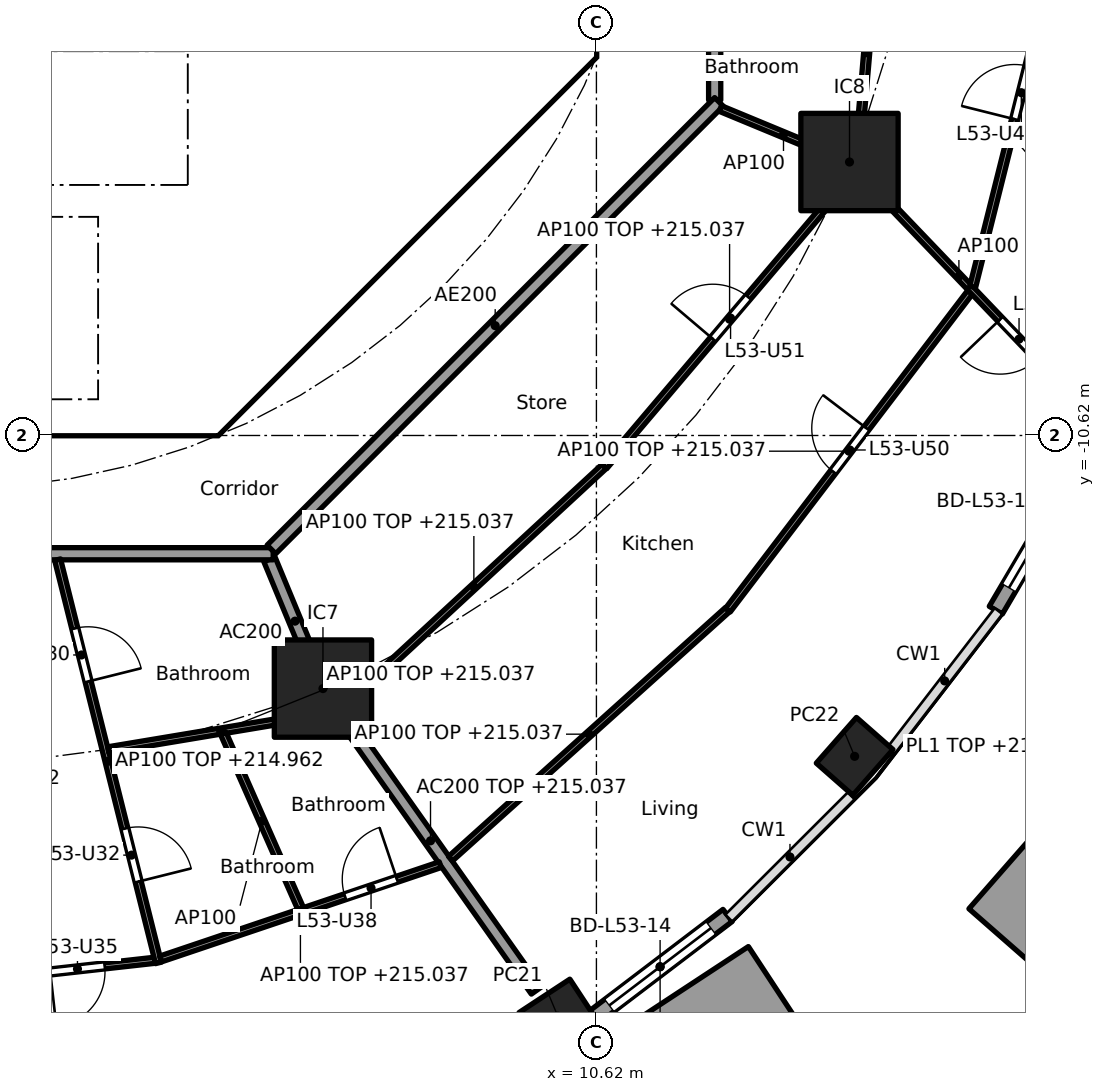
"""IFC4 building model, lengths in metres.
Left out: names, types, materials, properties, quantities, classifications, styles, units other than length and angle.
Written with IfcOpenShell. Run it as: python <this file> out.ifc"""

import sys

from ifc_helpers import new_model, si_unit, direction, frame, frame_2d, origin, origin_2d, place, context, subcontext, project, spatial, polyline, rectangle, hollow_rectangle, outline, extrude, element, fill, save


model = new_model("IFC4")
c1 = context("Model", 3, precision=1e-05, world=origin(), true_north=direction((0.0, 1.0)))
c2 = subcontext(c1, "Body", "Model", "MODEL_VIEW")
j1 = project(units=[si_unit("LENGTHUNIT", "METRE"), si_unit("PLANEANGLEUNIT", "RADIAN")], contexts=[c1])
p1 = place(None, origin())
s1 = spatial("IfcSite", under=j1, at=p1, CompositionType="ELEMENT")
p2 = place(p1, origin())
s2 = spatial("IfcBuilding", under=s1, at=p2, CompositionType="ELEMENT")
p3 = place(p2, frame((0.0, 0.0, 212.2)))
s3 = spatial("IfcBuildingStorey", under=s2, at=p3, CompositionType="ELEMENT", Elevation=212.2)
for number, where, z_axis, x_axis in (
    (1, (9.985, -20.17, -0.26), (0.0, 0.0, 1.0), (0.836, 0.549, 0.0)),
    (2, (14.866, -15.896, -0.26), (0.0, 0.0, 1.0), (0.66, 0.751, 0.0)),
):
    element("IfcColumn", number, at=place(p3, frame(where, z_axis=z_axis, x_axis=x_axis)), inside=s3, PredefinedType="COLUMN", context=c2, shape_type="SweptSolid", body=[
        extrude(hollow_rectangle(XDim=1.0, YDim=0.8, WallThickness=0.032, at=origin_2d()), origin(), (0.0, 0.0, 1.0), 3.96),
    ])
for number, where, z_axis, x_axis in (
    (3, (6.123, -14.782, 0.0), (0.0, 0.0, 1.0), (1.0, 0.0, 0.0)),
    (4, (14.782, -6.123, 0.0), (0.0, 0.0, 1.0), (1.0, 0.0, 0.0)),
):
    element("IfcColumn", number, at=place(p3, frame(where, z_axis=z_axis, x_axis=x_axis)), inside=s3, PredefinedType="COLUMN", context=c2, shape_type="SweptSolid", body=[
        extrude(rectangle(XDim=1.6, YDim=1.6, at=origin_2d()), origin(), (0.0, 0.0, 1.0), 3.7),
    ])
p4 = place(p3, frame((12.777, -18.513, 0.0), z_axis=(0.0, 0.0, 1.0), x_axis=(-0.796022158395, -0.605267480825, 0.0)))
e5 = element("IfcWall", 5, at=p4, inside=s3, PredefinedType="SOLIDWALL", context=c2, shape_type="SweptSolid", body=[
    extrude(rectangle(XDim=2.789, YDim=0.25, at=frame_2d((1.395, 0.0))), origin(), (0.0, 0.0, 1.0), 3.44),
])
p5 = place(p4, frame((0.344, 0.0, 0.0)))
e6 = element("IfcOpeningElement", 6, at=p5, cuts=e5, PredefinedType="OPENING", context=c2, shape_type="SweptSolid", body=[
    extrude(rectangle(XDim=2.1, YDim=2.4, at=frame_2d((1.05, 1.2))), frame((0.0, 0.135, 0.0), z_axis=(0.0, -1.0, 0.0), x_axis=(1.0, 0.0, 0.0)), (0.0, 0.0, 1.0), 0.27),
])
p6 = place(p3, frame((18.684, -10.945, 0.0), z_axis=(0.0, 0.0, 1.0), x_axis=(-0.5063555387, -0.862324804484, 0.0)))
e7 = element("IfcWall", 7, at=p6, inside=s3, PredefinedType="SOLIDWALL", context=c2, shape_type="SweptSolid", body=[
    extrude(rectangle(XDim=2.955, YDim=0.25, at=frame_2d((1.477, 0.0))), origin(), (0.0, 0.0, 1.0), 3.44),
])
p7 = place(p6, frame((0.427, 0.0, 0.0)))
e8 = element("IfcOpeningElement", 8, at=p7, cuts=e7, PredefinedType="OPENING", context=c2, shape_type="SweptSolid", body=[
    extrude(rectangle(XDim=2.1, YDim=2.4, at=frame_2d((1.05, 1.2))), frame((0.0, 0.135, 0.0), z_axis=(0.0, -1.0, 0.0), x_axis=(1.0, 0.0, 0.0)), (0.0, 0.0, 1.0), 0.27),
])
p8 = place(p3, frame((8.084, -23.289, 0.0), z_axis=(0.0, 0.0, 1.0), x_axis=(0.83581006315, 0.549018704907, 0.0)))
e9 = element("IfcWall", 9, at=p8, inside=s3, PredefinedType="SOLIDWALL", context=c2, shape_type="SweptSolid", body=[
    extrude(rectangle(XDim=6.55, YDim=1.6, at=frame_2d((3.275, 0.0))), origin(), (0.0, 0.0, 1.0), 1.1),
])
p9 = place(p3, frame((20.423, -19.665, 0.0), z_axis=(0.0, 0.0, 1.0), x_axis=(-0.795875560639, -0.605460231541, 0.0)))
e10 = element("IfcWall", 10, at=p9, inside=s3, PredefinedType="SOLIDWALL", context=c2, shape_type="SweptSolid", body=[
    extrude(rectangle(XDim=9.44, YDim=1.6, at=frame_2d((4.72, 0.0))), origin(), (0.0, 0.0, 1.0), 1.1),
])
p10 = place(p3, frame((17.348, -18.93, 0.0), z_axis=(0.0, 0.0, 1.0), x_axis=(0.65874885124, 0.752362911759, 0.0)))
e11 = element("IfcWall", 11, at=p10, inside=s3, PredefinedType="SOLIDWALL", context=c2, shape_type="SweptSolid", body=[
    extrude(rectangle(XDim=4.316, YDim=1.6, at=frame_2d((2.158, 0.0))), origin(), (0.0, 0.0, 1.0), 1.1),
])
p11 = place(p3, frame((4.613, -9.988, 0.0), z_axis=(0.0, 0.0, 1.0), x_axis=(0.707106781187, 0.707106781187, 0.0)))
e12 = element("IfcWall", 12, at=p11, inside=s3, PredefinedType="SHEAR", context=c2, shape_type="SweptSolid", body=[
    extrude(rectangle(XDim=7.602, YDim=0.6, at=frame_2d((3.801, 0.0))), origin(), (0.0, 0.0, 1.0), 3.44),
])
p12 = place(p11, frame((3.201, 0.0, 0.0)))
e13 = element("IfcOpeningElement", 13, at=p12, cuts=e12, PredefinedType="OPENING", context=c2, shape_type="SweptSolid", body=[
    extrude(rectangle(XDim=1.2, YDim=2.1, at=frame_2d((0.6, 1.05))), frame((0.0, 0.31, 0.0), z_axis=(0.0, -1.0, 0.0), x_axis=(1.0, 0.0, 0.0)), (0.0, 0.0, 1.0), 0.62),
])
p13 = place(p3, frame((4.0, -10.025, 0.0), z_axis=(0.0, 0.0, 1.0), x_axis=(0.0, 1.0, 0.0)))
e14 = element("IfcWall", 14, at=p13, inside=s3, PredefinedType="SOLIDWALL", context=c2, shape_type="SweptSolid", body=[
    extrude(rectangle(XDim=3.0, YDim=0.2, at=frame_2d((1.5, 0.0))), origin(), (0.0, 0.0, 1.0), 3.44),
])
p14 = place(p13, frame((0.975, 0.0, 0.0)))
e15 = element("IfcOpeningElement", 15, at=p14, cuts=e14, PredefinedType="OPENING", context=c2, shape_type="SweptSolid", body=[
    extrude(rectangle(XDim=1.1, YDim=2.1, at=frame_2d((0.55, 1.05))), frame((0.0, 0.11, 0.0), z_axis=(0.0, -1.0, 0.0), x_axis=(1.0, 0.0, 0.0)), (0.0, 0.0, 1.0), 0.22),
])
p15 = place(p3, frame((4.0, -6.5, 0.0), z_axis=(0.0, 0.0, 1.0), x_axis=(0.0, 1.0, 0.0)))
e16 = element("IfcWall", 16, at=p15, inside=s3, PredefinedType="SOLIDWALL", context=c2, shape_type="SweptSolid", body=[
    extrude(rectangle(XDim=2.2, YDim=0.2, at=frame_2d((1.1, 0.0))), origin(), (0.0, 0.0, 1.0), 3.44),
])
p16 = place(p15, frame((0.55, 0.0, 0.0)))
e17 = element("IfcOpeningElement", 17, at=p16, cuts=e16, PredefinedType="OPENING", context=c2, shape_type="SweptSolid", body=[
    extrude(rectangle(XDim=1.1, YDim=2.1, at=frame_2d((0.55, 1.05))), frame((0.0, 0.11, 0.0), z_axis=(0.0, -1.0, 0.0), x_axis=(1.0, 0.0, 0.0)), (0.0, 0.0, 1.0), 0.22),
])
p17 = place(p3, origin())
e18 = element("IfcWall", 18, at=p17, inside=s3, PredefinedType="SHEAR", context=c2, shape_type="SweptSolid", body=[
    extrude(outline(polyline([(-4.152, -10.025), (4.152, -10.025), (4.401, -9.776), (4.825, -10.2), (4.401, -10.625), (-4.401, -10.625), (-4.825, -10.2), (-4.401, -9.776), (-4.152, -10.025)])), origin(), (0.0, 0.0, 1.0), 3.44),
])
p18 = place(p3, origin())
e19 = element("IfcWall", 19, at=p18, inside=s3, PredefinedType="SHEAR", context=c2, shape_type="SweptSolid", body=[
    extrude(outline(polyline([(9.776, -4.401), (10.025, -4.152), (10.025, -3.801), (10.025, 4.152), (9.776, 4.401), (10.2, 4.825), (10.625, 4.401), (10.625, -4.401), (10.2, -4.825), (9.776, -4.401)])), origin(), (0.0, 0.0, 1.0), 3.44),
])
p19 = place(p3, origin())
e20 = element("IfcWall", 20, at=p19, inside=s3, PredefinedType="SOLIDWALL", context=c2, shape_type="SweptSolid", body=[
    extrude(outline(polyline([(4.1, -7.025), (-4.1, -7.025), (-4.1, -6.5), (4.1, -6.5), (4.1, -7.025)])), origin(), (0.0, 0.0, 1.0), 3.44),
])
p20 = place(p3, frame((5.243, -12.657, 0.0), z_axis=(0.0, 0.0, 1.0), x_axis=(0.382691608661, -0.923876145736, 0.0)))
e21 = element("IfcWall", 21, at=p20, inside=s3, PredefinedType="PARTITIONING", context=c2, shape_type="SweptSolid", body=[
    extrude(rectangle(XDim=2.2, YDim=0.2, at=frame_2d((1.1, 0.0))), origin(), (0.0, 0.0, 1.0), 3.44),
])
p21 = place(p3, frame((6.152, -14.823, 0.0), z_axis=(0.0, 0.0, 1.0), x_axis=(0.576994695158, -0.816747893637, 0.0)))
e22 = element("IfcWall", 22, at=p21, inside=s3, PredefinedType="PARTITIONING", context=c2, shape_type="SweptSolid", body=[
    extrude(rectangle(XDim=6.03, YDim=0.2, at=frame_2d((3.015, 0.0))), origin(), (0.0, 0.0, 1.0), 2.837),
])
p22 = place(p3, frame((12.565, -5.104, 0.0), z_axis=(0.0, 0.0, 1.0), x_axis=(0.0, 1.0, 0.0)))
e23 = element("IfcWall", 23, at=p22, inside=s3, PredefinedType="PARTITIONING", context=c2, shape_type="SweptSolid", body=[
    extrude(rectangle(XDim=10.209, YDim=0.2, at=frame_2d((5.104, 0.0))), origin(), (0.0, 0.0, 1.0), 3.44),
])
p23 = place(p22, frame((4.604, 0.0, 0.0)))
e24 = element("IfcOpeningElement", 24, at=p23, cuts=e23, PredefinedType="OPENING", context=c2, shape_type="SweptSolid", body=[
    extrude(rectangle(XDim=1.0, YDim=2.1, at=frame_2d((0.5, 1.05))), frame((0.0, 0.11, 0.0), z_axis=(0.0, -1.0, 0.0), x_axis=(1.0, 0.0, 0.0)), (0.0, 0.0, 1.0), 0.22),
])
p24 = place(p3, frame((-5.104, -12.565, 0.0), z_axis=(0.0, 0.0, 1.0), x_axis=(1.0, 0.0, 0.0)))
e25 = element("IfcWall", 25, at=p24, inside=s3, PredefinedType="PARTITIONING", context=c2, shape_type="SweptSolid", body=[
    extrude(rectangle(XDim=10.409, YDim=0.2, at=frame_2d((5.205, 0.0))), origin(), (0.0, 0.0, 1.0), 3.44),
])
p25 = place(p24, frame((4.604, 0.0, 0.0)))
e26 = element("IfcOpeningElement", 26, at=p25, cuts=e25, PredefinedType="OPENING", context=c2, shape_type="SweptSolid", body=[
    extrude(rectangle(XDim=1.0, YDim=2.1, at=frame_2d((0.5, 1.05))), frame((0.0, 0.11, 0.0), z_axis=(0.0, -1.0, 0.0), x_axis=(1.0, 0.0, 0.0)), (0.0, 0.0, 1.0), 0.22),
])
p26 = place(p3, frame((5.275, -12.494, 0.0), z_axis=(0.0, 0.0, 1.0), x_axis=(0.707106781187, 0.707106781187, 0.0)))
e27 = element("IfcWall", 27, at=p26, inside=s3, PredefinedType="PARTITIONING", context=c2, shape_type="SweptSolid", body=[
    extrude(rectangle(XDim=10.409, YDim=0.2, at=frame_2d((5.205, 0.0))), origin(), (0.0, 0.0, 1.0), 3.44),
])
p27 = place(p3, frame((-1.726, -19.818, 0.0), z_axis=(0.0, 0.0, 1.0), x_axis=(0.99381893047, 0.111013212902, 0.0)))
e28 = element("IfcWall", 28, at=p27, inside=s3, PredefinedType="PARTITIONING", context=c2, shape_type="SweptSolid", body=[
    extrude(rectangle(XDim=5.113, YDim=0.1, at=frame_2d((2.557, 0.0))), origin(), (0.0, 0.0, 1.0), 2.837),
])
p28 = place(p27, frame((3.385, 0.0, 0.0)))
e29 = element("IfcOpeningElement", 29, at=p28, cuts=e28, PredefinedType="OPENING", context=c2, shape_type="SweptSolid", body=[
    extrude(rectangle(XDim=0.9, YDim=2.1, at=frame_2d((0.45, 1.05))), frame((0.0, 0.06, 0.0), z_axis=(0.0, -1.0, 0.0), x_axis=(1.0, 0.0, 0.0)), (0.0, 0.0, 1.0), 0.12),
])
p29 = place(p3, frame((1.759, -12.662, 0.0), z_axis=(0.0, 0.0, 1.0), x_axis=(0.242653275363, -0.970113079984, 0.0)))
e30 = element("IfcWall", 30, at=p29, inside=s3, PredefinedType="PARTITIONING", context=c2, shape_type="SweptSolid", body=[
    extrude(rectangle(XDim=6.836, YDim=0.1, at=frame_2d((3.418, 0.0))), origin(), (0.0, 0.0, 1.0), 2.762),
])
p30 = place(p29, frame((1.166, 0.0, 0.0)))
e31 = element("IfcOpeningElement", 31, at=p30, cuts=e30, PredefinedType="OPENING", context=c2, shape_type="SweptSolid", body=[
    extrude(rectangle(XDim=0.9, YDim=2.1, at=frame_2d((0.45, 1.05))), frame((0.0, 0.06, 0.0), z_axis=(0.0, -1.0, 0.0), x_axis=(1.0, 0.0, 0.0)), (0.0, 0.0, 1.0), 0.12),
])
p31 = place(p29, frame((4.559, 0.0, 0.0)))
e32 = element("IfcOpeningElement", 32, at=p31, cuts=e30, PredefinedType="OPENING", context=c2, shape_type="SweptSolid", body=[
    extrude(rectangle(XDim=0.9, YDim=2.1, at=frame_2d((0.45, 1.05))), frame((0.0, 0.06, 0.0), z_axis=(0.0, -1.0, 0.0), x_axis=(1.0, 0.0, 0.0)), (0.0, 0.0, 1.0), 0.12),
])
p32 = place(p3, frame((2.593, -15.789, 0.0), z_axis=(0.0, 0.0, 1.0), x_axis=(0.986385117656, 0.164451815639, 0.0)))
e33 = element("IfcWall", 33, at=p32, inside=s3, PredefinedType="PARTITIONING", context=c2, shape_type="SweptSolid", body=[
    extrude(rectangle(XDim=3.747, YDim=0.1, at=frame_2d((1.874, 0.0))), origin(), (0.0, 0.0, 1.0), 2.837),
])
p33 = place(p3, frame((3.453, -19.229, 0.0), z_axis=(0.0, 0.0, 1.0), x_axis=(0.947565610716, 0.31956128268, 0.0)))
e34 = element("IfcWall", 34, at=p33, inside=s3, PredefinedType="PARTITIONING", context=c2, shape_type="SweptSolid", body=[
    extrude(rectangle(XDim=4.853, YDim=0.1, at=frame_2d((2.426, 0.0))), origin(), (0.0, 0.0, 1.0), 2.837),
])
p34 = place(p33, frame((3.202, 0.0, 0.0)))
e35 = element("IfcOpeningElement", 35, at=p34, cuts=e34, PredefinedType="OPENING", context=c2, shape_type="SweptSolid", body=[
    extrude(rectangle(XDim=0.9, YDim=2.1, at=frame_2d((0.45, 1.05))), frame((0.0, 0.06, 0.0), z_axis=(0.0, -1.0, 0.0), x_axis=(1.0, 0.0, 0.0)), (0.0, 0.0, 1.0), 0.12),
])
p35 = place(p3, frame((4.485, -15.522, 0.0), z_axis=(0.0, 0.0, 1.0), x_axis=(0.40391918208, -0.914794673327, 0.0)))
e36 = element("IfcWall", 36, at=p35, inside=s3, PredefinedType="PARTITIONING", context=c2, shape_type="SweptSolid", body=[
    extrude(rectangle(XDim=3.146, YDim=0.1, at=frame_2d((1.573, 0.0))), origin(), (0.0, 0.0, 1.0), 3.44),
])
p36 = place(p3, frame((6.461, -15.088, 0.0), z_axis=(0.0, 0.0, 1.0), x_axis=(0.73461579427, 0.678483334217, 0.0)))
e37 = element("IfcWall", 37, at=p36, inside=s3, PredefinedType="PARTITIONING", context=c2, shape_type="SweptSolid", body=[
    extrude(rectangle(XDim=5.837, YDim=0.1, at=frame_2d((2.918, 0.0))), origin(), (0.0, 0.0, 1.0), 2.837),
])
p37 = place(p3, frame((8.22, -17.579, 0.0), z_axis=(0.0, 0.0, 1.0), x_axis=(0.743696370895, 0.668517544958, 0.0)))
e38 = element("IfcWall", 38, at=p37, inside=s3, PredefinedType="PARTITIONING", context=c2, shape_type="SweptSolid", body=[
    extrude(rectangle(XDim=6.125, YDim=0.1, at=frame_2d((3.062, 0.0))), origin(), (0.0, 0.0, 1.0), 2.837),
])
p38 = place(p3, frame((10.753, -11.132, 0.0), z_axis=(0.0, 0.0, 1.0), x_axis=(0.647001799757, 0.762488472773, 0.0)))
e39 = element("IfcWall", 39, at=p38, inside=s3, PredefinedType="PARTITIONING", context=c2, shape_type="SweptSolid", body=[
    extrude(rectangle(XDim=6.359, YDim=0.1, at=frame_2d((3.179, 0.0))), origin(), (0.0, 0.0, 1.0), 2.837),
])
p39 = place(p38, frame((2.754, 0.0, 0.0)))
e40 = element("IfcOpeningElement", 40, at=p39, cuts=e39, PredefinedType="OPENING", context=c2, shape_type="SweptSolid", body=[
    extrude(rectangle(XDim=0.9, YDim=2.1, at=frame_2d((0.45, 1.05))), frame((0.0, 0.06, 0.0), z_axis=(0.0, -1.0, 0.0), x_axis=(1.0, 0.0, 0.0)), (0.0, 0.0, 1.0), 0.12),
])
p40 = place(p3, frame((12.782, -13.491, 0.0), z_axis=(0.0, 0.0, 1.0), x_axis=(0.606136140755, 0.795360911078, 0.0)))
e41 = element("IfcWall", 41, at=p40, inside=s3, PredefinedType="PARTITIONING", context=c2, shape_type="SweptSolid", body=[
    extrude(rectangle(XDim=6.57, YDim=0.1, at=frame_2d((3.285, 0.0))), origin(), (0.0, 0.0, 1.0), 2.837),
])
p41 = place(p40, frame((2.86, 0.0, 0.0)))
e42 = element("IfcOpeningElement", 42, at=p41, cuts=e41, PredefinedType="OPENING", context=c2, shape_type="SweptSolid", body=[
    extrude(rectangle(XDim=0.9, YDim=2.1, at=frame_2d((0.45, 1.05))), frame((0.0, 0.06, 0.0), z_axis=(0.0, -1.0, 0.0), x_axis=(1.0, 0.0, 0.0)), (0.0, 0.0, 1.0), 0.12),
])
p42 = place(p3, frame((12.657, -5.243, 0.0), z_axis=(0.0, 0.0, 1.0), x_axis=(0.923864733477, -0.382719158442, 0.0)))
e43 = element("IfcWall", 43, at=p42, inside=s3, PredefinedType="PARTITIONING", context=c2, shape_type="SweptSolid", body=[
    extrude(rectangle(XDim=2.25, YDim=0.1, at=frame_2d((1.125, 0.0))), origin(), (0.0, 0.0, 1.0), 3.44),
])
p43 = place(p3, frame((14.817, -6.159, 0.0), z_axis=(0.0, 0.0, 1.0), x_axis=(0.691437669875, -0.722436120828, 0.0)))
e44 = element("IfcWall", 44, at=p43, inside=s3, PredefinedType="PARTITIONING", context=c2, shape_type="SweptSolid", body=[
    extrude(rectangle(XDim=5.104, YDim=0.1, at=frame_2d((2.552, 0.0))), origin(), (0.0, 0.0, 1.0), 3.44),
])
p44 = place(p43, frame((3.532, 0.0, 0.0)))
e45 = element("IfcOpeningElement", 45, at=p44, cuts=e44, PredefinedType="OPENING", context=c2, shape_type="SweptSolid", body=[
    extrude(rectangle(XDim=0.9, YDim=2.1, at=frame_2d((0.45, 1.05))), frame((0.0, 0.06, 0.0), z_axis=(0.0, -1.0, 0.0), x_axis=(1.0, 0.0, 0.0)), (0.0, 0.0, 1.0), 0.12),
])
p45 = place(p3, frame((14.904, -6.196, 0.0), z_axis=(0.0, 0.0, 1.0), x_axis=(0.085843822439, 0.996308605879, 0.0)))
e46 = element("IfcWall", 46, at=p45, inside=s3, PredefinedType="PARTITIONING", context=c2, shape_type="SweptSolid", body=[
    extrude(rectangle(XDim=3.754, YDim=0.1, at=frame_2d((1.877, 0.0))), origin(), (0.0, 0.0, 1.0), 2.837),
])
p46 = place(p3, frame((16.807, -8.177, 0.0), z_axis=(0.0, 0.0, 1.0), x_axis=(0.243002985225, 0.970025540474, 0.0)))
e47 = element("IfcWall", 47, at=p46, inside=s3, PredefinedType="PARTITIONING", context=c2, shape_type="SweptSolid", body=[
    extrude(rectangle(XDim=5.162, YDim=0.1, at=frame_2d((2.581, 0.0))), origin(), (0.0, 0.0, 1.0), 2.837),
])
p47 = place(p46, frame((2.844, 0.0, 0.0)))
e48 = element("IfcOpeningElement", 48, at=p47, cuts=e47, PredefinedType="OPENING", context=c2, shape_type="SweptSolid", body=[
    extrude(rectangle(XDim=0.9, YDim=2.1, at=frame_2d((0.45, 1.05))), frame((0.0, 0.06, 0.0), z_axis=(0.0, -1.0, 0.0), x_axis=(1.0, 0.0, 0.0)), (0.0, 0.0, 1.0), 0.12),
])
p48 = place(p5, origin())
e49 = element("IfcDoor", 49, at=p48, inside=s3, OperationType="SLIDING_TO_LEFT", PredefinedType="DOOR", context=c2, shape_type="SweptSolid", body=[
    extrude(rectangle(XDim=2.1, YDim=2.4, at=frame_2d((1.05, 1.2))), frame((0.0, 0.025, 0.0), z_axis=(0.0, -1.0, 0.0), x_axis=(1.0, 0.0, 0.0)), (0.0, 0.0, 1.0), 0.05),
])
fill(e6, e49)
p49 = place(p7, origin())
e50 = element("IfcDoor", 50, at=p49, inside=s3, OperationType="SLIDING_TO_LEFT", PredefinedType="DOOR", context=c2, shape_type="SweptSolid", body=[
    extrude(rectangle(XDim=2.1, YDim=2.4, at=frame_2d((1.05, 1.2))), frame((0.0, 0.025, 0.0), z_axis=(0.0, -1.0, 0.0), x_axis=(1.0, 0.0, 0.0)), (0.0, 0.0, 1.0), 0.05),
])
fill(e8, e50)
p50 = place(p16, origin())
e51 = element("IfcDoor", 51, at=p50, inside=s3, OperationType="DOUBLE_DOOR_SLIDING", PredefinedType="DOOR", context=c2, shape_type="SweptSolid", body=[
    extrude(rectangle(XDim=1.1, YDim=2.1, at=frame_2d((0.55, 1.05))), frame((0.0, 0.025, 0.0), z_axis=(0.0, -1.0, 0.0), x_axis=(1.0, 0.0, 0.0)), (0.0, 0.0, 1.0), 0.05),
])
fill(e17, e51)
p51 = place(p14, origin())
e52 = element("IfcDoor", 52, at=p51, inside=s3, OperationType="SINGLE_SWING_LEFT", PredefinedType="DOOR", context=c2, shape_type="SweptSolid", body=[
    extrude(rectangle(XDim=1.1, YDim=2.1, at=frame_2d((0.55, 1.05))), frame((0.0, 0.025, 0.0), z_axis=(0.0, -1.0, 0.0), x_axis=(1.0, 0.0, 0.0)), (0.0, 0.0, 1.0), 0.05),
])
fill(e15, e52)
p52 = place(p12, origin())
e53 = element("IfcDoor", 53, at=p52, inside=s3, OperationType="SINGLE_SWING_LEFT", PredefinedType="DOOR", context=c2, shape_type="SweptSolid", body=[
    extrude(rectangle(XDim=1.2, YDim=2.1, at=frame_2d((0.6, 1.05))), frame((0.0, 0.025, 0.0), z_axis=(0.0, -1.0, 0.0), x_axis=(1.0, 0.0, 0.0)), (0.0, 0.0, 1.0), 0.05),
])
fill(e13, e53)
p53 = place(p30, origin())
e54 = element("IfcDoor", 54, at=p53, inside=s3, OperationType="SINGLE_SWING_RIGHT", PredefinedType="DOOR", context=c2, shape_type="SweptSolid", body=[
    extrude(rectangle(XDim=0.9, YDim=2.1, at=frame_2d((0.45, 1.05))), frame((0.0, 0.025, 0.0), z_axis=(0.0, -1.0, 0.0), x_axis=(1.0, 0.0, 0.0)), (0.0, 0.0, 1.0), 0.05),
])
fill(e31, e54)
p54 = place(p31, origin())
e55 = element("IfcDoor", 55, at=p54, inside=s3, OperationType="SINGLE_SWING_RIGHT", PredefinedType="DOOR", context=c2, shape_type="SweptSolid", body=[
    extrude(rectangle(XDim=0.9, YDim=2.1, at=frame_2d((0.45, 1.05))), frame((0.0, 0.025, 0.0), z_axis=(0.0, -1.0, 0.0), x_axis=(1.0, 0.0, 0.0)), (0.0, 0.0, 1.0), 0.05),
])
fill(e32, e55)
p55 = place(p28, frame((0.9, 0.0, 0.0), x_axis=(-1.0, 0.0, 0.0)))
e56 = element("IfcDoor", 56, at=p55, inside=s3, OperationType="SINGLE_SWING_RIGHT", PredefinedType="DOOR", context=c2, shape_type="SweptSolid", body=[
    extrude(rectangle(XDim=0.9, YDim=2.1, at=frame_2d((0.45, 1.05))), frame((0.0, 0.025, 0.0), z_axis=(0.0, -1.0, 0.0), x_axis=(1.0, 0.0, 0.0)), (0.0, 0.0, 1.0), 0.05),
])
fill(e29, e56)
p56 = place(p34, origin())
e57 = element("IfcDoor", 57, at=p56, inside=s3, OperationType="SINGLE_SWING_RIGHT", PredefinedType="DOOR", context=c2, shape_type="SweptSolid", body=[
    extrude(rectangle(XDim=0.9, YDim=2.1, at=frame_2d((0.45, 1.05))), frame((0.0, 0.025, 0.0), z_axis=(0.0, -1.0, 0.0), x_axis=(1.0, 0.0, 0.0)), (0.0, 0.0, 1.0), 0.05),
])
fill(e35, e57)
p57 = place(p47, origin())
e58 = element("IfcDoor", 58, at=p57, inside=s3, OperationType="SINGLE_SWING_LEFT", PredefinedType="DOOR", context=c2, shape_type="SweptSolid", body=[
    extrude(rectangle(XDim=0.9, YDim=2.1, at=frame_2d((0.45, 1.05))), frame((0.0, 0.025, 0.0), z_axis=(0.0, -1.0, 0.0), x_axis=(1.0, 0.0, 0.0)), (0.0, 0.0, 1.0), 0.05),
])
fill(e48, e58)
p58 = place(p44, frame((0.9, 0.0, 0.0), x_axis=(-1.0, 0.0, 0.0)))
e59 = element("IfcDoor", 59, at=p58, inside=s3, OperationType="SINGLE_SWING_RIGHT", PredefinedType="DOOR", context=c2, shape_type="SweptSolid", body=[
    extrude(rectangle(XDim=0.9, YDim=2.1, at=frame_2d((0.45, 1.05))), frame((0.0, 0.025, 0.0), z_axis=(0.0, -1.0, 0.0), x_axis=(1.0, 0.0, 0.0)), (0.0, 0.0, 1.0), 0.05),
])
fill(e45, e59)
p59 = place(p41, origin())
e60 = element("IfcDoor", 60, at=p59, inside=s3, OperationType="SINGLE_SWING_RIGHT", PredefinedType="DOOR", context=c2, shape_type="SweptSolid", body=[
    extrude(rectangle(XDim=0.9, YDim=2.1, at=frame_2d((0.45, 1.05))), frame((0.0, 0.025, 0.0), z_axis=(0.0, -1.0, 0.0), x_axis=(1.0, 0.0, 0.0)), (0.0, 0.0, 1.0), 0.05),
])
fill(e42, e60)
p60 = place(p39, origin())
e61 = element("IfcDoor", 61, at=p60, inside=s3, OperationType="SINGLE_SWING_LEFT", PredefinedType="DOOR", context=c2, shape_type="SweptSolid", body=[
    extrude(rectangle(XDim=0.9, YDim=2.1, at=frame_2d((0.45, 1.05))), frame((0.0, 0.025, 0.0), z_axis=(0.0, -1.0, 0.0), x_axis=(1.0, 0.0, 0.0)), (0.0, 0.0, 1.0), 0.05),
])
fill(e40, e61)
save(model, sys.argv[1])
